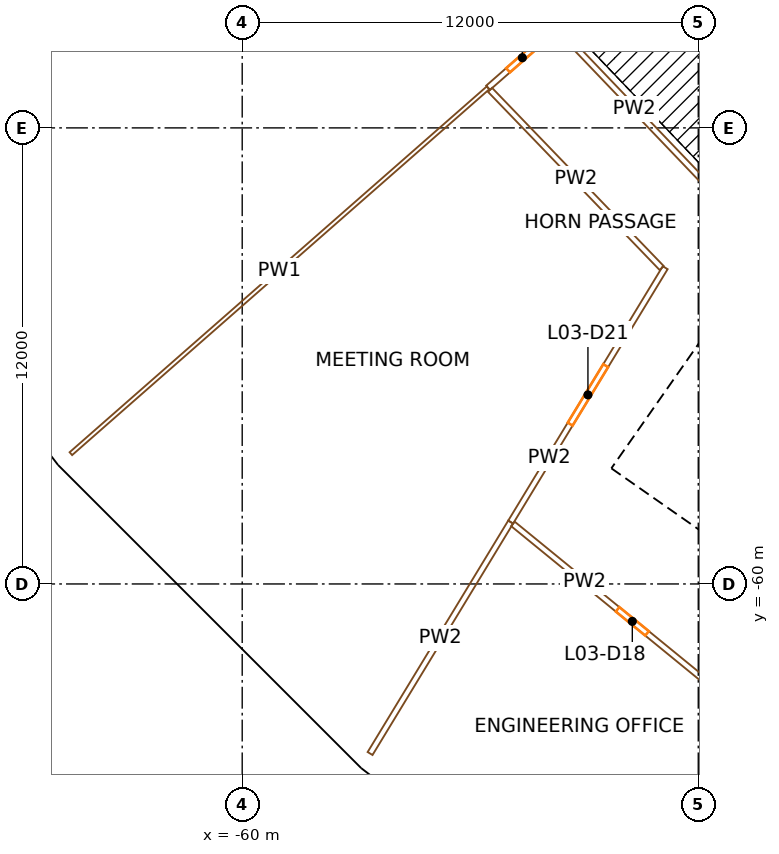
"""IFC4 building model, lengths in metres.
Left out: names, types, materials, properties, quantities, classifications, styles, units other than length and angle.
Written with IfcOpenShell. Run it as: python <this file> out.ifc"""

import sys

from ifc_helpers import new_model, si_unit, direction, frame, frame_2d, origin, origin_2d, place, context, subcontext, project, spatial, rectangle, extrude, element, fill, save


model = new_model("IFC4")
c1 = context("Model", 3, precision=1e-05, world=origin(), true_north=direction((0.0, 1.0)))
c2 = subcontext(c1, "Body", "Model", "MODEL_VIEW")
j1 = project(units=[si_unit("LENGTHUNIT", "METRE"), si_unit("PLANEANGLEUNIT", "RADIAN")], contexts=[c1])
p1 = place(None, origin())
s1 = spatial("IfcSite", under=j1, at=p1, CompositionType="ELEMENT")
p2 = place(p1, origin())
s2 = spatial("IfcBuilding", under=s1, at=p2, CompositionType="ELEMENT")
p3 = place(p2, frame((0.0, 0.0, 27.0)))
s3 = spatial("IfcBuildingStorey", under=s2, at=p3, CompositionType="ELEMENT", Elevation=27.0)
p4 = place(p3, frame((-58.456, -51.264, 0.0), z_axis=(0.0, 0.0, 1.0), x_axis=(0.6593458151, -0.751839807479, 0.0)))
e1 = element("IfcColumn", 1, at=p4, inside=s3, PredefinedType="COLUMN", context=c2, shape_type="SweptSolid", body=[
    extrude(rectangle(XDim=1.4, YDim=1.8, at=origin_2d()), origin(), (0.0, 0.0, 1.0), 4.5),
])
p5 = place(p3, frame((-64.094, -56.209, 0.0), z_axis=(0.0, 0.0, 1.0), x_axis=(0.6593458151, -0.751839807479, 0.0)))
e2 = element("IfcColumn", 2, at=p5, inside=s3, PredefinedType="COLUMN", context=c2, shape_type="SweptSolid", body=[
    extrude(rectangle(XDim=1.1, YDim=1.3, at=origin_2d()), origin(), (0.0, 0.0, 1.0), 4.5),
])
p6 = place(p3, frame((-51.264, -58.456, 0.0), z_axis=(0.0, 0.0, 1.0), x_axis=(0.751839807479, -0.6593458151, 0.0)))
e3 = element("IfcColumn", 3, at=p6, inside=s3, PredefinedType="COLUMN", context=c2, shape_type="SweptSolid", body=[
    extrude(rectangle(XDim=1.4, YDim=1.8, at=origin_2d()), origin(), (0.0, 0.0, 1.0), 4.5),
])
p7 = place(p3, frame((-56.209, -64.094, 0.0), z_axis=(0.0, 0.0, 1.0), x_axis=(0.751839807479, -0.6593458151, 0.0)))
e4 = element("IfcColumn", 4, at=p7, inside=s3, PredefinedType="COLUMN", context=c2, shape_type="SweptSolid", body=[
    extrude(rectangle(XDim=1.1, YDim=1.3, at=origin_2d()), origin(), (0.0, 0.0, 1.0), 4.5),
])
p8 = place(p3, frame((-49.779, -57.191, 0.0), z_axis=(0.0, 0.0, 1.0), x_axis=(0.573577477574, 0.819151315216, 0.0)))
e5 = element("IfcWall", 5, at=p8, inside=s3, PredefinedType="SHEAR", context=c2, shape_type="SweptSolid", body=[
    extrude(rectangle(XDim=14.8, YDim=0.9, at=frame_2d((7.4, 0.0))), origin(), (0.0, 0.0, 1.0), 4.1),
])
p9 = place(p8, frame((6.7, 0.0, 0.0)))
e6 = element("IfcOpeningElement", 6, at=p9, cuts=e5, PredefinedType="OPENING", context=c2, shape_type="SweptSolid", body=[
    extrude(rectangle(XDim=1.4, YDim=2.1, at=frame_2d((0.7, 1.05))), frame((0.0, 0.46, 0.0), z_axis=(0.0, -1.0, 0.0), x_axis=(1.0, 0.0, 0.0)), (0.0, 0.0, 1.0), 0.92),
])
p10 = place(p3, frame((-36.827, -65.71, 0.0), z_axis=(0.0, 0.0, 1.0), x_axis=(-0.819153391756, 0.573574511963, 0.0)))
e7 = element("IfcWall", 7, at=p10, inside=s3, PredefinedType="SHEAR", context=c2, shape_type="SweptSolid", body=[
    extrude(rectangle(XDim=15.045, YDim=0.9, at=frame_2d((7.523, 0.0))), origin(), (0.0, 0.0, 1.0), 4.1),
])
p11 = place(p10, frame((1.05, 0.0, 0.0)))
e8 = element("IfcOpeningElement", 8, at=p11, cuts=e7, PredefinedType="OPENING", context=c2, shape_type="SweptSolid", body=[
    extrude(rectangle(XDim=1.0, YDim=2.1, at=frame_2d((0.5, 1.05))), frame((0.0, 0.46, 0.0), z_axis=(0.0, -1.0, 0.0), x_axis=(1.0, 0.0, 0.0)), (0.0, 0.0, 1.0), 0.92),
])
p12 = place(p10, frame((3.625, 0.0, 0.0)))
e9 = element("IfcOpeningElement", 9, at=p12, cuts=e7, PredefinedType="OPENING", context=c2, shape_type="SweptSolid", body=[
    extrude(rectangle(XDim=1.0, YDim=2.1, at=frame_2d((0.5, 1.05))), frame((0.0, 0.46, 0.0), z_axis=(0.0, -1.0, 0.0), x_axis=(1.0, 0.0, 0.0)), (0.0, 0.0, 1.0), 0.92),
])
p13 = place(p10, frame((6.075, 0.0, 0.0)))
e10 = element("IfcOpeningElement", 10, at=p13, cuts=e7, PredefinedType="OPENING", context=c2, shape_type="SweptSolid", body=[
    extrude(rectangle(XDim=1.0, YDim=2.1, at=frame_2d((0.5, 1.05))), frame((0.0, 0.46, 0.0), z_axis=(0.0, -1.0, 0.0), x_axis=(1.0, 0.0, 0.0)), (0.0, 0.0, 1.0), 0.92),
])
p14 = place(p10, frame((13.495, 0.0, 0.0)))
e11 = element("IfcOpeningElement", 11, at=p14, cuts=e7, PredefinedType="OPENING", context=c2, shape_type="SweptSolid", body=[
    extrude(rectangle(XDim=1.1, YDim=2.1, at=frame_2d((0.55, 1.05))), frame((0.0, 0.46, 0.0), z_axis=(0.0, -1.0, 0.0), x_axis=(1.0, 0.0, 0.0)), (0.0, 0.0, 1.0), 0.92),
])
p15 = place(p3, frame((-71.491, -47.839, 0.0), z_axis=(0.0, 0.0, 1.0), x_axis=(0.608758773695, -0.793355377778, 0.0)))
e12 = element("IfcWall", 12, at=p15, inside=s3, PredefinedType="SOLIDWALL", context=c2, shape_type="SweptSolid", body=[
    extrude(rectangle(XDim=11.135, YDim=0.45, at=frame_2d((5.567, 0.0))), origin(), (0.0, 0.0, 1.0), 3.2),
])
p16 = place(p15, frame((3.917, 0.0, 0.9)))
e13 = element("IfcOpeningElement", 13, at=p16, cuts=e12, PredefinedType="OPENING", context=c2, shape_type="SweptSolid", body=[
    extrude(rectangle(XDim=1.2, YDim=2.15, at=frame_2d((0.6, 1.075))), frame((0.0, 0.235, 0.0), z_axis=(0.0, -1.0, 0.0), x_axis=(1.0, 0.0, 0.0)), (0.0, 0.0, 1.0), 0.47),
])
p17 = place(p15, frame((6.017, 0.0, 0.9)))
e14 = element("IfcOpeningElement", 14, at=p17, cuts=e12, PredefinedType="OPENING", context=c2, shape_type="SweptSolid", body=[
    extrude(rectangle(XDim=1.2, YDim=2.15, at=frame_2d((0.6, 1.075))), frame((0.0, 0.235, 0.0), z_axis=(0.0, -1.0, 0.0), x_axis=(1.0, 0.0, 0.0)), (0.0, 0.0, 1.0), 0.47),
])
p18 = place(p3, frame((-64.698, -56.699, 0.0), z_axis=(0.0, 0.0, 1.0), x_axis=(0.707106781187, -0.707106781187, 0.0)))
e15 = element("IfcWall", 15, at=p18, inside=s3, PredefinedType="SOLIDWALL", context=c2, shape_type="SweptSolid", body=[
    extrude(rectangle(XDim=11.312, YDim=0.45, at=frame_2d((5.656, 0.0))), origin(), (0.0, 0.0, 1.0), 3.2),
])
p19 = place(p18, frame((4.006, 0.0, 0.9)))
e16 = element("IfcOpeningElement", 16, at=p19, cuts=e15, PredefinedType="OPENING", context=c2, shape_type="SweptSolid", body=[
    extrude(rectangle(XDim=1.2, YDim=2.15, at=frame_2d((0.6, 1.075))), frame((0.0, 0.235, 0.0), z_axis=(0.0, -1.0, 0.0), x_axis=(1.0, 0.0, 0.0)), (0.0, 0.0, 1.0), 0.47),
])
p20 = place(p18, frame((6.106, 0.0, 0.9)))
e17 = element("IfcOpeningElement", 17, at=p20, cuts=e15, PredefinedType="OPENING", context=c2, shape_type="SweptSolid", body=[
    extrude(rectangle(XDim=1.2, YDim=2.15, at=frame_2d((0.6, 1.075))), frame((0.0, 0.235, 0.0), z_axis=(0.0, -1.0, 0.0), x_axis=(1.0, 0.0, 0.0)), (0.0, 0.0, 1.0), 0.47),
])
p21 = place(p3, frame((-56.673, -64.713, 0.0), z_axis=(0.0, 0.0, 1.0), x_axis=(0.793355377778, -0.608758773695, 0.0)))
e18 = element("IfcWall", 18, at=p21, inside=s3, PredefinedType="SOLIDWALL", context=c2, shape_type="SweptSolid", body=[
    extrude(rectangle(XDim=11.135, YDim=0.45, at=frame_2d((5.567, 0.0))), origin(), (0.0, 0.0, 1.0), 3.2),
])
p22 = place(p21, frame((3.917, 0.0, 0.9)))
e19 = element("IfcOpeningElement", 19, at=p22, cuts=e18, PredefinedType="OPENING", context=c2, shape_type="SweptSolid", body=[
    extrude(rectangle(XDim=1.2, YDim=2.15, at=frame_2d((0.6, 1.075))), frame((0.0, 0.235, 0.0), z_axis=(0.0, -1.0, 0.0), x_axis=(1.0, 0.0, 0.0)), (0.0, 0.0, 1.0), 0.47),
])
p23 = place(p21, frame((6.017, 0.0, 0.9)))
e20 = element("IfcOpeningElement", 20, at=p23, cuts=e18, PredefinedType="OPENING", context=c2, shape_type="SweptSolid", body=[
    extrude(rectangle(XDim=1.2, YDim=2.15, at=frame_2d((0.6, 1.075))), frame((0.0, 0.235, 0.0), z_axis=(0.0, -1.0, 0.0), x_axis=(1.0, 0.0, 0.0)), (0.0, 0.0, 1.0), 0.47),
])
p24 = place(p3, frame((-64.508, -56.572, 0.0), z_axis=(0.0, 0.0, 1.0), x_axis=(0.751837641873, 0.659348284492, 0.0)))
e21 = element("IfcWall", 21, at=p24, inside=s3, PredefinedType="PARTITIONING", context=c2, shape_type="SweptSolid", body=[
    extrude(rectangle(XDim=14.6, YDim=0.1, at=frame_2d((7.3, 0.0))), origin(), (0.0, 0.0, 1.0), 3.1),
])
p25 = place(p3, frame((-53.531, -46.945, 0.0), z_axis=(0.0, 0.0, 1.0), x_axis=(0.751876772813, 0.659303661832, 0.0)))
e22 = element("IfcWall", 22, at=p25, inside=s3, PredefinedType="PARTITIONING", context=c2, shape_type="SweptSolid", body=[
    extrude(rectangle(XDim=2.4, YDim=0.15, at=frame_2d((1.2, 0.0))), origin(), (0.0, 0.0, 1.0), 3.1),
])
p26 = place(p25, frame((0.7, 0.0, 0.0)))
e23 = element("IfcOpeningElement", 23, at=p26, cuts=e22, PredefinedType="OPENING", context=c2, shape_type="SweptSolid", body=[
    extrude(rectangle(XDim=1.0, YDim=2.1, at=frame_2d((0.5, 1.05))), frame((0.0, 0.085, 0.0), z_axis=(0.0, -1.0, 0.0), x_axis=(1.0, 0.0, 0.0)), (0.0, 0.0, 1.0), 0.17),
])
p27 = place(p3, frame((-52.936, -58.372, 0.0), z_axis=(0.0, 0.0, 1.0), x_axis=(-0.519148894699, -0.854683815883, 0.0)))
e24 = element("IfcWall", 24, at=p27, inside=s3, PredefinedType="PARTITIONING", context=c2, shape_type="SweptSolid", body=[
    extrude(rectangle(XDim=7.125, YDim=0.15, at=frame_2d((3.563, 0.0))), origin(), (0.0, 0.0, 1.0), 3.1),
])
p28 = place(p3, frame((-46.594, -63.549, 0.0), z_axis=(0.0, 0.0, 1.0), x_axis=(-0.774664810718, 0.632372066931, 0.0)))
e25 = element("IfcWall", 25, at=p28, inside=s3, PredefinedType="PARTITIONING", context=c2, shape_type="SweptSolid", body=[
    extrude(rectangle(XDim=8.112, YDim=0.15, at=frame_2d((4.056, 0.0))), origin(), (0.0, 0.0, 1.0), 3.1),
])
p29 = place(p28, frame((3.556, 0.0, 0.0)))
e26 = element("IfcOpeningElement", 26, at=p29, cuts=e25, PredefinedType="OPENING", context=c2, shape_type="SweptSolid", body=[
    extrude(rectangle(XDim=1.0, YDim=2.1, at=frame_2d((0.5, 1.05))), frame((0.0, 0.085, 0.0), z_axis=(0.0, -1.0, 0.0), x_axis=(1.0, 0.0, 0.0)), (0.0, 0.0, 1.0), 0.17),
])
p30 = place(p3, frame((-50.635, -69.062, 0.0), z_axis=(0.0, 0.0, 1.0), x_axis=(0.591304174152, 0.806448618097, 0.0)))
e27 = element("IfcWall", 27, at=p30, inside=s3, PredefinedType="PARTITIONING", context=c2, shape_type="SweptSolid", body=[
    extrude(rectangle(XDim=6.761, YDim=0.1, at=frame_2d((3.38, 0.0))), origin(), (0.0, 0.0, 1.0), 3.1),
])
p31 = place(p3, frame((-48.961, -51.689, 0.0), z_axis=(0.0, 0.0, 1.0), x_axis=(-0.693805223412, 0.72016269826, 0.0)))
e28 = element("IfcWall", 28, at=p31, inside=s3, PredefinedType="PARTITIONING", context=c2, shape_type="SweptSolid", body=[
    extrude(rectangle(XDim=6.512, YDim=0.15, at=frame_2d((3.256, 0.0))), origin(), (0.0, 0.0, 1.0), 3.1),
])
p32 = place(p3, frame((-52.936, -58.372, 0.0), z_axis=(0.0, 0.0, 1.0), x_axis=(0.519169312849, 0.854671413232, 0.0)))
e29 = element("IfcWall", 29, at=p32, inside=s3, PredefinedType="PARTITIONING", context=c2, shape_type="SweptSolid", body=[
    extrude(rectangle(XDim=7.831, YDim=0.15, at=frame_2d((3.915, 0.0))), origin(), (0.0, 0.0, 1.0), 3.1),
])
p33 = place(p32, frame((3.015, 0.0, 0.0)))
e30 = element("IfcOpeningElement", 30, at=p33, cuts=e29, PredefinedType="OPENING", context=c2, shape_type="SweptSolid", body=[
    extrude(rectangle(XDim=1.8, YDim=2.1, at=frame_2d((0.9, 1.05))), frame((0.0, 0.085, 0.0), z_axis=(0.0, -1.0, 0.0), x_axis=(1.0, 0.0, 0.0)), (0.0, 0.0, 1.0), 0.17),
])
p34 = place(p3, frame((-47.686, -49.589, 0.0), z_axis=(0.0, 0.0, 1.0), x_axis=(-0.691111241065, 0.722748401917, 0.0)))
e31 = element("IfcWall", 31, at=p34, inside=s3, PredefinedType="PARTITIONING", context=c2, shape_type="SweptSolid", body=[
    extrude(rectangle(XDim=5.772, YDim=0.15, at=frame_2d((2.886, 0.0))), origin(), (0.0, 0.0, 1.0), 3.1),
])
p35 = place(p14, origin())
e32 = element("IfcDoor", 32, at=p35, inside=s3, OperationType="SINGLE_SWING_LEFT", PredefinedType="DOOR", context=c2, shape_type="SweptSolid", body=[
    extrude(rectangle(XDim=1.1, YDim=2.1, at=frame_2d((0.55, 1.05))), frame((0.0, 0.025, 0.0), z_axis=(0.0, -1.0, 0.0), x_axis=(1.0, 0.0, 0.0)), (0.0, 0.0, 1.0), 0.05),
])
fill(e11, e32)
p36 = place(p19, origin())
e33 = element("IfcWindow", 33, at=p36, inside=s3, PartitioningType="SINGLE_PANEL", PredefinedType="WINDOW", context=c2, shape_type="SweptSolid", body=[
    extrude(rectangle(XDim=1.2, YDim=2.15, at=frame_2d((0.6, 1.075))), frame((0.0, 0.03, 0.0), z_axis=(0.0, -1.0, 0.0), x_axis=(1.0, 0.0, 0.0)), (0.0, 0.0, 1.0), 0.06),
])
fill(e16, e33)
p37 = place(p20, origin())
e34 = element("IfcWindow", 34, at=p37, inside=s3, PartitioningType="SINGLE_PANEL", PredefinedType="WINDOW", context=c2, shape_type="SweptSolid", body=[
    extrude(rectangle(XDim=1.2, YDim=2.15, at=frame_2d((0.6, 1.075))), frame((0.0, 0.03, 0.0), z_axis=(0.0, -1.0, 0.0), x_axis=(1.0, 0.0, 0.0)), (0.0, 0.0, 1.0), 0.06),
])
fill(e17, e34)
p38 = place(p29, origin())
e35 = element("IfcDoor", 35, at=p38, inside=s3, OperationType="SINGLE_SWING_RIGHT", PredefinedType="DOOR", context=c2, shape_type="SweptSolid", body=[
    extrude(rectangle(XDim=1.0, YDim=2.1, at=frame_2d((0.5, 1.05))), frame((0.0, 0.025, 0.0), z_axis=(0.0, -1.0, 0.0), x_axis=(1.0, 0.0, 0.0)), (0.0, 0.0, 1.0), 0.05),
])
fill(e26, e35)
p39 = place(p33, origin())
e36 = element("IfcDoor", 36, at=p39, inside=s3, OperationType="DOUBLE_DOOR_SINGLE_SWING", PredefinedType="DOOR", context=c2, shape_type="SweptSolid", body=[
    extrude(rectangle(XDim=1.8, YDim=2.1, at=frame_2d((0.9, 1.05))), frame((0.0, 0.025, 0.0), z_axis=(0.0, -1.0, 0.0), x_axis=(1.0, 0.0, 0.0)), (0.0, 0.0, 1.0), 0.05),
])
fill(e30, e36)
p40 = place(p26, origin())
e37 = element("IfcDoor", 37, at=p40, inside=s3, OperationType="SINGLE_SWING_RIGHT", PredefinedType="DOOR", context=c2, shape_type="SweptSolid", body=[
    extrude(rectangle(XDim=1.0, YDim=2.1, at=frame_2d((0.5, 1.05))), frame((0.0, 0.025, 0.0), z_axis=(0.0, -1.0, 0.0), x_axis=(1.0, 0.0, 0.0)), (0.0, 0.0, 1.0), 0.05),
])
fill(e23, e37)
save(model, sys.argv[1])
